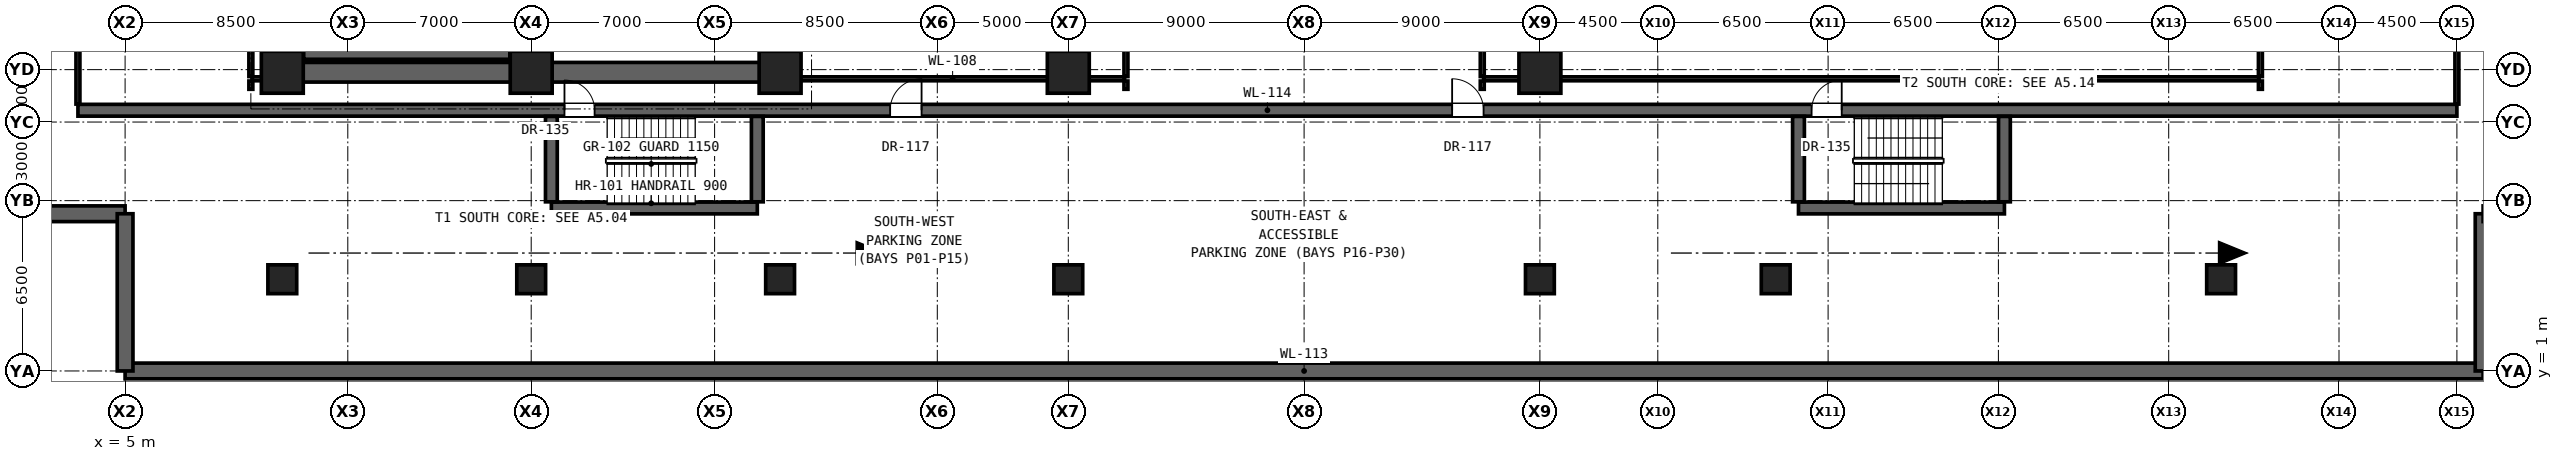
"""IFC4 building model, lengths in metres.
Left out: names, types, materials, properties, quantities, classifications, styles, units other than length and angle.
Written with IfcOpenShell. Run it as: python <this file> out.ifc"""

import sys

from ifc_helpers import new_model, si_unit, direction, frame, frame_2d, origin, origin_2d, place, context, subcontext, project, spatial, rectangle, extrude, element, fill, save


model = new_model("IFC4")
c1 = context("Model", 3, precision=1e-05, world=origin(), true_north=direction((0.0, 1.0)))
c2 = subcontext(c1, "Body", "Model", "MODEL_VIEW")
j1 = project(units=[si_unit("LENGTHUNIT", "METRE"), si_unit("PLANEANGLEUNIT", "RADIAN")], contexts=[c1])
p1 = place(None, origin())
s1 = spatial("IfcSite", under=j1, at=p1, CompositionType="ELEMENT")
p2 = place(p1, origin())
s2 = spatial("IfcBuilding", under=s1, at=p2, CompositionType="ELEMENT")
p3 = place(p2, frame((0.0, 0.0, -4.8)))
s3 = spatial("IfcBuildingStorey", under=s2, at=p3, CompositionType="ELEMENT", Elevation=-4.8)
p4 = place(p3, frame((5.0, 1.0, 0.0), z_axis=(0.0, 0.0, 1.0), x_axis=(1.0, 0.0, 0.0)))
e1 = element("IfcWall", 1, at=p4, inside=s3, PredefinedType="USERDEFINED", context=c2, shape_type="SweptSolid", body=[
    extrude(rectangle(XDim=90.0, YDim=0.6, at=frame_2d((45.0, 0.0))), origin(), (0.0, 0.0, 1.0), 4.62),
])
for number, where, z_axis, x_axis in (
    (2, (95.0, 1.0, 0.0), (0.0, 0.0, 1.0), (0.0, 1.0, 0.0)),
    (3, (-1.0, 7.0, 0.0), (0.0, 0.0, 1.0), (1.0, 0.0, 0.0)),
    (4, (5.0, 7.0, 0.0), (0.0, 0.0, 1.0), (0.0, -1.0, 0.0)),
):
    element("IfcWall", number, at=place(p3, frame(where, z_axis=z_axis, x_axis=x_axis)), inside=s3, PredefinedType="USERDEFINED", context=c2, shape_type="SweptSolid", body=[
        extrude(rectangle(XDim=6.0, YDim=0.6, at=frame_2d((3.0, 0.0))), origin(), (0.0, 0.0, 1.0), 4.62),
    ])
for number, where, z_axis, x_axis in (
    (5, (11.0, 12.4, 0.0), (0.0, 0.0, 1.0), (1.0, 0.0, 0.0)),
    (6, (20.5, 12.4, 0.0), (0.0, 0.0, 1.0), (1.0, 0.0, 0.0)),
    (7, (30.0, 12.4, 0.0), (0.0, 0.0, 1.0), (1.0, 0.0, 0.0)),
):
    element("IfcColumn", number, at=place(p3, frame(where, z_axis=z_axis, x_axis=x_axis)), inside=s3, PredefinedType="COLUMN", context=c2, shape_type="SweptSolid", body=[
        extrude(rectangle(XDim=1.6, YDim=1.6, at=origin_2d()), origin(), (0.0, 0.0, 1.0), 4.8),
    ])
p5 = place(p3, frame((11.0, 12.4, 0.0), z_axis=(0.0, 0.0, 1.0), x_axis=(1.0, 0.0, 0.0)))
e8 = element("IfcWall", 8, at=p5, inside=s3, PredefinedType="SHEAR", context=c2, shape_type="SweptSolid", body=[
    extrude(rectangle(XDim=19.0, YDim=0.75, at=frame_2d((9.5, 0.0))), origin(), (0.0, 0.0, 1.0), 4.48),
])
for number, where, z_axis, x_axis in (
    (9, (11.0, 12.4, 0.0), (0.0, 0.0, 1.0), (0.0, 1.0, 0.0)),
    (10, (30.0, 12.4, 0.0), (0.0, 0.0, 1.0), (0.0, 1.0, 0.0)),
):
    element("IfcWall", number, at=place(p3, frame(where, z_axis=z_axis, x_axis=x_axis)), inside=s3, PredefinedType="SHEAR", context=c2, shape_type="SweptSolid", body=[
        extrude(rectangle(XDim=6.0, YDim=0.75, at=frame_2d((3.0, 0.0))), origin(), (0.0, 0.0, 1.0), 4.48),
    ])
for number, where, z_axis, x_axis in (
    (11, (41.0, 12.4, 0.0), (0.0, 0.0, 1.0), (1.0, 0.0, 0.0)),
    (12, (59.0, 12.4, 0.0), (0.0, 0.0, 1.0), (1.0, 0.0, 0.0)),
):
    element("IfcColumn", number, at=place(p3, frame(where, z_axis=z_axis, x_axis=x_axis)), inside=s3, PredefinedType="COLUMN", context=c2, shape_type="SweptSolid", body=[
        extrude(rectangle(XDim=1.6, YDim=1.6, at=origin_2d()), origin(), (0.0, 0.0, 1.0), 4.8),
    ])
for number, where, z_axis, x_axis in (
    (13, (11.0, 4.5, 0.0), (0.0, 0.0, 1.0), (1.0, 0.0, 0.0)),
    (14, (20.5, 4.5, 0.0), (0.0, 0.0, 1.0), (1.0, 0.0, 0.0)),
    (15, (30.0, 4.5, 0.0), (0.0, 0.0, 1.0), (1.0, 0.0, 0.0)),
    (16, (41.0, 4.5, 0.0), (0.0, 0.0, 1.0), (1.0, 0.0, 0.0)),
    (17, (59.0, 4.5, 0.0), (0.0, 0.0, 1.0), (1.0, 0.0, 0.0)),
    (18, (68.0, 4.5, 0.0), (0.0, 0.0, 1.0), (1.0, 0.0, 0.0)),
    (19, (85.0, 4.5, 0.0), (0.0, 0.0, 1.0), (1.0, 0.0, 0.0)),
):
    element("IfcColumn", number, at=place(p3, frame(where, z_axis=z_axis, x_axis=x_axis)), inside=s3, PredefinedType="COLUMN", context=c2, shape_type="SweptSolid", body=[
        extrude(rectangle(XDim=1.1, YDim=1.1, at=origin_2d()), origin(), (0.0, 0.0, 1.0), 4.8),
    ])
for number, where, z_axis, x_axis in (
    (20, (21.27, 7.22, 0.0), (0.0, 0.0, 1.0), (1.0, 0.0, 0.0)),
    (21, (68.87, 7.22, 0.0), (0.0, 0.0, 1.0), (1.0, 0.0, 0.0)),
):
    element("IfcWall", number, at=place(p3, frame(where, z_axis=z_axis, x_axis=x_axis)), inside=s3, PredefinedType="SHEAR", context=c2, shape_type="SweptSolid", body=[
        extrude(rectangle(XDim=7.86, YDim=0.45, at=frame_2d((3.93, 0.0))), origin(), (0.0, 0.0, 1.0), 4.48),
    ])
p6 = place(p3, frame((3.2, 10.95, 0.0), z_axis=(0.0, 0.0, 1.0), x_axis=(1.0, 0.0, 0.0)))
e22 = element("IfcWall", 22, at=p6, inside=s3, PredefinedType="SHEAR", context=c2, shape_type="SweptSolid", body=[
    extrude(rectangle(XDim=90.8, YDim=0.45, at=frame_2d((45.4, 0.0))), origin(), (0.0, 0.0, 1.0), 4.48),
])
p7 = place(p6, frame((18.57, 0.0, 0.0)))
e23 = element("IfcOpeningElement", 23, at=p7, cuts=e22, PredefinedType="OPENING", context=c2, shape_type="SweptSolid", body=[
    extrude(rectangle(XDim=1.15, YDim=2.2, at=frame_2d((0.575, 1.1))), frame((0.0, 0.235, 0.0), z_axis=(0.0, -1.0, 0.0), x_axis=(1.0, 0.0, 0.0)), (0.0, 0.0, 1.0), 0.47),
])
p8 = place(p6, frame((66.17, 0.0, 0.0)))
e24 = element("IfcOpeningElement", 24, at=p8, cuts=e22, PredefinedType="OPENING", context=c2, shape_type="SweptSolid", body=[
    extrude(rectangle(XDim=1.15, YDim=2.2, at=frame_2d((0.575, 1.1))), frame((0.0, 0.235, 0.0), z_axis=(0.0, -1.0, 0.0), x_axis=(1.0, 0.0, 0.0)), (0.0, 0.0, 1.0), 0.47),
])
p9 = place(p6, frame((31.0, 0.0, 0.0)))
e25 = element("IfcOpeningElement", 25, at=p9, cuts=e22, PredefinedType="OPENING", context=c2, shape_type="SweptSolid", body=[
    extrude(rectangle(XDim=1.2, YDim=2.25, at=frame_2d((0.6, 1.125))), frame((0.0, 0.235, 0.0), z_axis=(0.0, -1.0, 0.0), x_axis=(1.0, 0.0, 0.0)), (0.0, 0.0, 1.0), 0.47),
])
p10 = place(p6, frame((52.45, 0.0, 0.0)))
e26 = element("IfcOpeningElement", 26, at=p10, cuts=e22, PredefinedType="OPENING", context=c2, shape_type="SweptSolid", body=[
    extrude(rectangle(XDim=1.2, YDim=2.25, at=frame_2d((0.6, 1.125))), frame((0.0, 0.235, 0.0), z_axis=(0.0, -1.0, 0.0), x_axis=(1.0, 0.0, 0.0)), (0.0, 0.0, 1.0), 0.47),
])
p11 = place(p3, frame((9.85, 12.15, 0.0), z_axis=(0.0, 0.0, 1.0), x_axis=(1.0, 0.0, 0.0)))
e27 = element("IfcWall", 27, at=p11, inside=s3, PredefinedType="PARTITIONING", context=c2, shape_type="SweptSolid", body=[
    extrude(rectangle(XDim=1.13, YDim=0.15, at=frame_2d((0.565, 0.0))), origin(), (0.0, 0.0, 1.0), 3.519),
])
p12 = place(p3, frame((30.02, 12.15, 0.0), z_axis=(0.0, 0.0, 1.0), x_axis=(1.0, 0.0, 0.0)))
e28 = element("IfcWall", 28, at=p12, inside=s3, PredefinedType="PARTITIONING", context=c2, shape_type="SweptSolid", body=[
    extrude(rectangle(XDim=13.13, YDim=0.15, at=frame_2d((6.565, 0.0))), origin(), (0.0, 0.0, 1.0), 3.252),
])
p13 = place(p3, frame((56.85, 12.15, 0.0), z_axis=(0.0, 0.0, 1.0), x_axis=(1.0, 0.0, 0.0)))
e29 = element("IfcWall", 29, at=p13, inside=s3, PredefinedType="PARTITIONING", context=c2, shape_type="SweptSolid", body=[
    extrude(rectangle(XDim=29.6, YDim=0.15, at=frame_2d((14.8, 0.0))), origin(), (0.0, 0.0, 1.0), 3.252),
])
p14 = place(p3, frame((11.815, 13.12, 0.0), z_axis=(0.0, 0.0, 1.0), x_axis=(1.0, 0.0, 0.0)))
e30 = element("IfcWall", 30, at=p14, inside=s3, PredefinedType="SHEAR", context=c2, shape_type="SweptSolid", body=[
    extrude(rectangle(XDim=7.87, YDim=0.45, at=frame_2d((3.935, 0.0))), origin(), (0.0, 0.0, 1.0), 4.48),
])
p15 = place(p3, frame((3.2, 11.185, 0.0), z_axis=(0.0, 0.0, 1.0), x_axis=(0.0, 1.0, 0.0)))
e31 = element("IfcWall", 31, at=p15, inside=s3, PredefinedType="PARTITIONING", context=c2, shape_type="SweptSolid", body=[
    extrude(rectangle(XDim=42.43, YDim=0.15, at=frame_2d((21.215, 0.0))), origin(), (0.0, 0.0, 1.0), 3.372),
])
p16 = place(p3, frame((9.8, 11.75, 0.0), z_axis=(0.0, 0.0, 1.0), x_axis=(0.0, 1.0, 0.0)))
e32 = element("IfcWall", 32, at=p16, inside=s3, PredefinedType="PARTITIONING", context=c2, shape_type="SweptSolid", body=[
    extrude(rectangle(XDim=0.315, YDim=0.15, at=frame_2d((0.157, 0.0))), origin(), (0.0, 0.0, 1.0), 4.3),
])
p17 = place(p3, frame((9.8, 12.235, 0.0), z_axis=(0.0, 0.0, 1.0), x_axis=(0.0, 1.0, 0.0)))
e33 = element("IfcWall", 33, at=p17, inside=s3, PredefinedType="PARTITIONING", context=c2, shape_type="SweptSolid", body=[
    extrude(rectangle(XDim=6.23, YDim=0.15, at=frame_2d((3.115, 0.0))), origin(), (0.0, 0.0, 1.0), 3.372),
])
for number, where, z_axis, x_axis in (
    (34, (21.27, 7.455, 0.0), (0.0, 0.0, 1.0), (0.0, 1.0, 0.0)),
    (35, (29.13, 7.455, 0.0), (0.0, 0.0, 1.0), (0.0, 1.0, 0.0)),
):
    element("IfcWall", number, at=place(p3, frame(where, z_axis=z_axis, x_axis=x_axis)), inside=s3, PredefinedType="SHEAR", context=c2, shape_type="SweptSolid", body=[
        extrude(rectangle(XDim=3.26, YDim=0.45, at=frame_2d((1.63, 0.0))), origin(), (0.0, 0.0, 1.0), 4.48),
    ])
p18 = place(p3, frame((43.2, 11.75, 0.0), z_axis=(0.0, 0.0, 1.0), x_axis=(0.0, 1.0, 0.0)))
e36 = element("IfcWall", 36, at=p18, inside=s3, PredefinedType="PARTITIONING", context=c2, shape_type="SweptSolid", body=[
    extrude(rectangle(XDim=0.315, YDim=0.15, at=frame_2d((0.157, 0.0))), origin(), (0.0, 0.0, 1.0), 4.3),
])
p19 = place(p3, frame((43.2, 12.235, 0.0), z_axis=(0.0, 0.0, 1.0), x_axis=(0.0, 1.0, 0.0)))
e37 = element("IfcWall", 37, at=p19, inside=s3, PredefinedType="PARTITIONING", context=c2, shape_type="SweptSolid", body=[
    extrude(rectangle(XDim=6.23, YDim=0.15, at=frame_2d((3.115, 0.0))), origin(), (0.0, 0.0, 1.0), 3.252),
])
p20 = place(p3, frame((56.8, 11.75, 0.0), z_axis=(0.0, 0.0, 1.0), x_axis=(0.0, 1.0, 0.0)))
e38 = element("IfcWall", 38, at=p20, inside=s3, PredefinedType="PARTITIONING", context=c2, shape_type="SweptSolid", body=[
    extrude(rectangle(XDim=0.315, YDim=0.15, at=frame_2d((0.157, 0.0))), origin(), (0.0, 0.0, 1.0), 4.3),
])
p21 = place(p3, frame((56.8, 12.235, 0.0), z_axis=(0.0, 0.0, 1.0), x_axis=(0.0, 1.0, 0.0)))
e39 = element("IfcWall", 39, at=p21, inside=s3, PredefinedType="PARTITIONING", context=c2, shape_type="SweptSolid", body=[
    extrude(rectangle(XDim=8.63, YDim=0.15, at=frame_2d((4.315, 0.0))), origin(), (0.0, 0.0, 1.0), 3.252),
])
for number, where, z_axis, x_axis in (
    (40, (68.87, 7.455, 0.0), (0.0, 0.0, 1.0), (0.0, 1.0, 0.0)),
    (41, (76.73, 7.455, 0.0), (0.0, 0.0, 1.0), (0.0, 1.0, 0.0)),
):
    element("IfcWall", number, at=place(p3, frame(where, z_axis=z_axis, x_axis=x_axis)), inside=s3, PredefinedType="SHEAR", context=c2, shape_type="SweptSolid", body=[
        extrude(rectangle(XDim=3.26, YDim=0.45, at=frame_2d((1.63, 0.0))), origin(), (0.0, 0.0, 1.0), 4.48),
    ])
p22 = place(p3, frame((86.5, 11.75, 0.0), z_axis=(0.0, 0.0, 1.0), x_axis=(0.0, 1.0, 0.0)))
e42 = element("IfcWall", 42, at=p22, inside=s3, PredefinedType="PARTITIONING", context=c2, shape_type="SweptSolid", body=[
    extrude(rectangle(XDim=0.315, YDim=0.15, at=frame_2d((0.157, 0.0))), origin(), (0.0, 0.0, 1.0), 4.3),
])
p23 = place(p3, frame((86.5, 12.235, 0.0), z_axis=(0.0, 0.0, 1.0), x_axis=(0.0, 1.0, 0.0)))
e43 = element("IfcWall", 43, at=p23, inside=s3, PredefinedType="PARTITIONING", context=c2, shape_type="SweptSolid", body=[
    extrude(rectangle(XDim=8.63, YDim=0.15, at=frame_2d((4.315, 0.0))), origin(), (0.0, 0.0, 1.0), 3.372),
])
p24 = place(p3, frame((94.0, 11.185, 0.0), z_axis=(0.0, 0.0, 1.0), x_axis=(0.0, 1.0, 0.0)))
e44 = element("IfcWall", 44, at=p24, inside=s3, PredefinedType="PARTITIONING", context=c2, shape_type="SweptSolid", body=[
    extrude(rectangle(XDim=42.43, YDim=0.15, at=frame_2d((21.215, 0.0))), origin(), (0.0, 0.0, 1.0), 3.436),
])
p25 = place(p24, frame((10.015, 0.0, 0.0)))
e45 = element("IfcOpeningElement", 45, at=p25, cuts=e44, PredefinedType="OPENING", context=c2, shape_type="SweptSolid", body=[
    extrude(rectangle(XDim=1.6, YDim=2.3, at=frame_2d((0.8, 1.15))), frame((0.0, 0.085, 0.0), z_axis=(0.0, -1.0, 0.0), x_axis=(1.0, 0.0, 0.0)), (0.0, 0.0, 1.0), 0.17),
])
p26 = place(p24, frame((24.415, 0.0, 0.0)))
e46 = element("IfcOpeningElement", 46, at=p26, cuts=e44, PredefinedType="OPENING", context=c2, shape_type="SweptSolid", body=[
    extrude(rectangle(XDim=1.2, YDim=2.25, at=frame_2d((0.6, 1.125))), frame((0.0, 0.085, 0.0), z_axis=(0.0, -1.0, 0.0), x_axis=(1.0, 0.0, 0.0)), (0.0, 0.0, 1.0), 0.17),
])
p27 = place(p7, origin())
e47 = element("IfcDoor", 47, at=p27, inside=s3, OperationType="SINGLE_SWING_LEFT", PredefinedType="DOOR", context=c2, shape_type="SweptSolid", body=[
    extrude(rectangle(XDim=1.15, YDim=2.2, at=frame_2d((0.575, 1.1))), frame((0.0, 0.025, 0.0), z_axis=(0.0, -1.0, 0.0), x_axis=(1.0, 0.0, 0.0)), (0.0, 0.0, 1.0), 0.05),
])
fill(e23, e47)
p28 = place(p8, origin())
e48 = element("IfcDoor", 48, at=p28, inside=s3, OperationType="SINGLE_SWING_RIGHT", PredefinedType="DOOR", context=c2, shape_type="SweptSolid", body=[
    extrude(rectangle(XDim=1.15, YDim=2.2, at=frame_2d((0.575, 1.1))), frame((0.0, 0.025, 0.0), z_axis=(0.0, -1.0, 0.0), x_axis=(1.0, 0.0, 0.0)), (0.0, 0.0, 1.0), 0.05),
])
fill(e24, e48)
p29 = place(p9, origin())
e49 = element("IfcDoor", 49, at=p29, inside=s3, OperationType="SINGLE_SWING_RIGHT", PredefinedType="DOOR", context=c2, shape_type="SweptSolid", body=[
    extrude(rectangle(XDim=1.2, YDim=2.25, at=frame_2d((0.6, 1.125))), frame((0.0, 0.025, 0.0), z_axis=(0.0, -1.0, 0.0), x_axis=(1.0, 0.0, 0.0)), (0.0, 0.0, 1.0), 0.05),
])
fill(e25, e49)
p30 = place(p10, origin())
e50 = element("IfcDoor", 50, at=p30, inside=s3, OperationType="SINGLE_SWING_LEFT", PredefinedType="DOOR", context=c2, shape_type="SweptSolid", body=[
    extrude(rectangle(XDim=1.2, YDim=2.25, at=frame_2d((0.6, 1.125))), frame((0.0, 0.025, 0.0), z_axis=(0.0, -1.0, 0.0), x_axis=(1.0, 0.0, 0.0)), (0.0, 0.0, 1.0), 0.05),
])
fill(e26, e50)
save(model, sys.argv[1])
